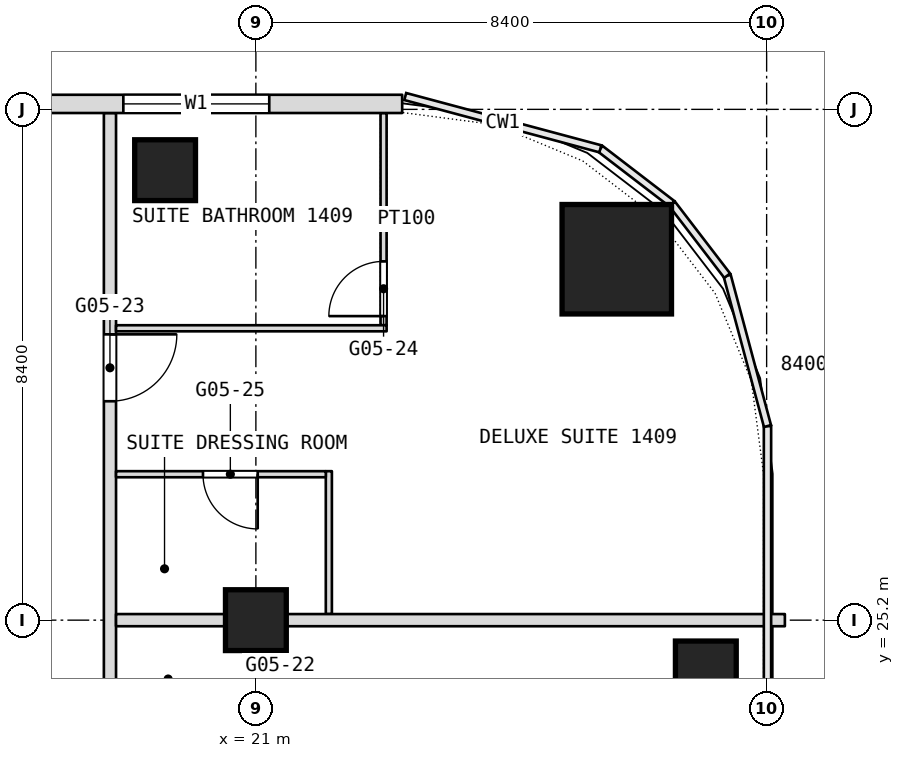
"""IFC4 building model, lengths in metres.
Left out: names, types, materials, properties, quantities, classifications, styles, units other than length and angle.
Written with IfcOpenShell. Run it as: python <this file> out.ifc"""

import sys

from ifc_helpers import new_model, si_unit, direction, frame, frame_2d, origin, origin_2d, place, context, subcontext, project, spatial, rectangle, extrude, element, fill, save


model = new_model("IFC4")
c1 = context("Model", 3, precision=1e-05, world=origin(), true_north=direction((0.0, 1.0)))
c2 = subcontext(c1, "Body", "Model", "MODEL_VIEW")
j1 = project(units=[si_unit("LENGTHUNIT", "METRE"), si_unit("PLANEANGLEUNIT", "RADIAN")], contexts=[c1])
p1 = place(None, origin())
s1 = spatial("IfcSite", under=j1, at=p1, CompositionType="ELEMENT")
p2 = place(p1, origin())
s2 = spatial("IfcBuilding", under=s1, at=p2, CompositionType="ELEMENT")
p3 = place(p2, frame((0.0, 0.0, 65.3)))
s3 = spatial("IfcBuildingStorey", under=s2, at=p3, CompositionType="ELEMENT", Elevation=65.3)
p4 = place(p3, frame((26.936, 31.135, 0.0), z_axis=(0.0, 0.0, 1.0), x_axis=(1.0, 0.0, 0.0)))
e1 = element("IfcColumn", 1, at=p4, inside=s3, PredefinedType="COLUMN", context=c2, shape_type="SweptSolid", body=[
    extrude(rectangle(XDim=1.8, YDim=1.8, at=origin_2d()), origin(), (0.0, 0.0, 1.0), 3.6),
])
for number, where, z_axis, x_axis in (
    (2, (21.0, 25.2, 0.0), (0.0, 0.0, 1.0), (1.0, 0.0, 0.0)),
    (3, (19.507, 32.6, 0.0), (0.0, 0.0, 1.0), (1.0, 0.0, 0.0)),
    (4, (28.4, 24.356, 0.0), (0.0, 0.0, 1.0), (1.0, 0.0, 0.0)),
):
    element("IfcColumn", number, at=place(p3, frame(where, z_axis=z_axis, x_axis=x_axis)), inside=s3, PredefinedType="COLUMN", context=c2, shape_type="SweptSolid", body=[
        extrude(rectangle(XDim=1.0, YDim=1.0, at=origin_2d()), origin(), (0.0, 0.0, 1.0), 3.6),
    ])
p5 = place(p3, frame((23.1, 30.05, 0.0), z_axis=(0.0, 0.0, 1.0), x_axis=(0.0, 1.0, 0.0)))
e5 = element("IfcWall", 5, at=p5, inside=s3, PredefinedType="PARTITIONING", context=c2, shape_type="SweptSolid", body=[
    extrude(rectangle(XDim=3.49, YDim=0.1, at=frame_2d((1.745, 0.0))), origin(), (0.0, 0.0, 1.0), 3.34),
])
p6 = place(p5, frame((0.15, 0.0, 0.0)))
e6 = element("IfcOpeningElement", 6, at=p6, cuts=e5, PredefinedType="OPENING", context=c2, shape_type="SweptSolid", body=[
    extrude(rectangle(XDim=0.9, YDim=2.1, at=frame_2d((0.45, 1.05))), frame((0.0, 0.05, 0.0), z_axis=(0.0, -1.0, 0.0), x_axis=(1.0, 0.0, 0.0)), (0.0, 0.0, 1.0), 0.1),
])
p7 = place(p3, frame((22.2, 25.3, 0.0), z_axis=(0.0, 0.0, 1.0), x_axis=(0.0, 1.0, 0.0)))
e7 = element("IfcWall", 7, at=p7, inside=s3, PredefinedType="PARTITIONING", context=c2, shape_type="SweptSolid", body=[
    extrude(rectangle(XDim=2.35, YDim=0.1, at=frame_2d((1.175, 0.0))), origin(), (0.0, 0.0, 1.0), 3.34),
])
p8 = place(p3, frame((21.4, 22.85, 0.0), z_axis=(0.0, 0.0, 1.0), x_axis=(0.0, 1.0, 0.0)))
e8 = element("IfcWall", 8, at=p8, inside=s3, PredefinedType="PARTITIONING", context=c2, shape_type="SweptSolid", body=[
    extrude(rectangle(XDim=2.45, YDim=0.1, at=frame_2d((1.225, 0.0))), origin(), (0.0, 0.0, 1.0), 3.34),
])
p9 = place(p8, frame((0.15, 0.0, 0.0)))
e9 = element("IfcOpeningElement", 9, at=p9, cuts=e8, PredefinedType="OPENING", context=c2, shape_type="SweptSolid", body=[
    extrude(rectangle(XDim=0.9, YDim=2.1, at=frame_2d((0.45, 1.05))), frame((0.0, 0.05, 0.0), z_axis=(0.0, -1.0, 0.0), x_axis=(1.0, 0.0, 0.0)), (0.0, 0.0, 1.0), 0.1),
])
p10 = place(p3, frame((18.6, -16.665, 0.0), z_axis=(0.0, 0.0, 1.0), x_axis=(0.0, 1.0, 0.0)))
e10 = element("IfcWall", 10, at=p10, inside=s3, PredefinedType="PARTITIONING", context=c2, shape_type="SweptSolid", body=[
    extrude(rectangle(XDim=50.205, YDim=0.2, at=frame_2d((25.103, 0.0))), origin(), (0.0, 0.0, 1.0), 3.34),
])
p11 = place(p10, frame((2.991, 0.0, 0.0)))
e11 = element("IfcOpeningElement", 11, at=p11, cuts=e10, PredefinedType="OPENING", context=c2, shape_type="SweptSolid", body=[
    extrude(rectangle(XDim=1.0, YDim=2.1, at=frame_2d((0.5, 1.05))), frame((0.0, 0.1, 0.0), z_axis=(0.0, -1.0, 0.0), x_axis=(1.0, 0.0, 0.0)), (0.0, 0.0, 1.0), 0.2),
])
p12 = place(p10, frame((4.574, 0.0, 0.0)))
e12 = element("IfcOpeningElement", 12, at=p12, cuts=e10, PredefinedType="OPENING", context=c2, shape_type="SweptSolid", body=[
    extrude(rectangle(XDim=1.0, YDim=2.1, at=frame_2d((0.5, 1.05))), frame((0.0, 0.1, 0.0), z_axis=(0.0, -1.0, 0.0), x_axis=(1.0, 0.0, 0.0)), (0.0, 0.0, 1.0), 0.2),
])
p13 = place(p10, frame((11.865, 0.0, 0.0)))
e13 = element("IfcOpeningElement", 13, at=p13, cuts=e10, PredefinedType="OPENING", context=c2, shape_type="SweptSolid", body=[
    extrude(rectangle(XDim=1.1, YDim=2.1, at=frame_2d((0.55, 1.05))), frame((0.0, 0.1, 0.0), z_axis=(0.0, -1.0, 0.0), x_axis=(1.0, 0.0, 0.0)), (0.0, 0.0, 1.0), 0.2),
])
p14 = place(p10, frame((20.365, 0.0, 0.0)))
e14 = element("IfcOpeningElement", 14, at=p14, cuts=e10, PredefinedType="OPENING", context=c2, shape_type="SweptSolid", body=[
    extrude(rectangle(XDim=1.1, YDim=2.1, at=frame_2d((0.55, 1.05))), frame((0.0, 0.1, 0.0), z_axis=(0.0, -1.0, 0.0), x_axis=(1.0, 0.0, 0.0)), (0.0, 0.0, 1.0), 0.2),
])
p15 = place(p10, frame((25.465, 0.0, 0.0)))
e15 = element("IfcOpeningElement", 15, at=p15, cuts=e10, PredefinedType="OPENING", context=c2, shape_type="SweptSolid", body=[
    extrude(rectangle(XDim=1.0, YDim=2.1, at=frame_2d((0.5, 1.05))), frame((0.0, 0.1, 0.0), z_axis=(0.0, -1.0, 0.0), x_axis=(1.0, 0.0, 0.0)), (0.0, 0.0, 1.0), 0.2),
])
p16 = place(p10, frame((32.065, 0.0, 0.0)))
e16 = element("IfcOpeningElement", 16, at=p16, cuts=e10, PredefinedType="OPENING", context=c2, shape_type="SweptSolid", body=[
    extrude(rectangle(XDim=1.0, YDim=2.1, at=frame_2d((0.5, 1.05))), frame((0.0, 0.1, 0.0), z_axis=(0.0, -1.0, 0.0), x_axis=(1.0, 0.0, 0.0)), (0.0, 0.0, 1.0), 0.2),
])
p17 = place(p10, frame((36.265, 0.0, 0.0)))
e17 = element("IfcOpeningElement", 17, at=p17, cuts=e10, PredefinedType="OPENING", context=c2, shape_type="SweptSolid", body=[
    extrude(rectangle(XDim=1.0, YDim=2.1, at=frame_2d((0.5, 1.05))), frame((0.0, 0.1, 0.0), z_axis=(0.0, -1.0, 0.0), x_axis=(1.0, 0.0, 0.0)), (0.0, 0.0, 1.0), 0.2),
])
p18 = place(p10, frame((38.065, 0.0, 0.0)))
e18 = element("IfcOpeningElement", 18, at=p18, cuts=e10, PredefinedType="OPENING", context=c2, shape_type="SweptSolid", body=[
    extrude(rectangle(XDim=1.0, YDim=2.1, at=frame_2d((0.5, 1.05))), frame((0.0, 0.1, 0.0), z_axis=(0.0, -1.0, 0.0), x_axis=(1.0, 0.0, 0.0)), (0.0, 0.0, 1.0), 0.2),
])
p19 = place(p10, frame((45.465, 0.0, 0.0)))
e19 = element("IfcOpeningElement", 19, at=p19, cuts=e10, PredefinedType="OPENING", context=c2, shape_type="SweptSolid", body=[
    extrude(rectangle(XDim=1.1, YDim=2.1, at=frame_2d((0.55, 1.05))), frame((0.0, 0.1, 0.0), z_axis=(0.0, -1.0, 0.0), x_axis=(1.0, 0.0, 0.0)), (0.0, 0.0, 1.0), 0.2),
])
p20 = place(p3, frame((18.7, 25.2, 0.0), z_axis=(0.0, 0.0, 1.0), x_axis=(1.0, 0.0, 0.0)))
e20 = element("IfcWall", 20, at=p20, inside=s3, PredefinedType="PARTITIONING", context=c2, shape_type="SweptSolid", body=[
    extrude(rectangle(XDim=11.0, YDim=0.2, at=frame_2d((5.5, 0.0))), origin(), (0.0, 0.0, 1.0), 2.84),
])
p21 = place(p3, frame((18.7, 27.6, 0.0), z_axis=(0.0, 0.0, 1.0), x_axis=(1.0, 0.0, 0.0)))
e21 = element("IfcWall", 21, at=p21, inside=s3, PredefinedType="PARTITIONING", context=c2, shape_type="SweptSolid", body=[
    extrude(rectangle(XDim=3.45, YDim=0.1, at=frame_2d((1.725, 0.0))), origin(), (0.0, 0.0, 1.0), 3.34),
])
p22 = place(p21, frame((1.43, 0.0, 0.0)))
e22 = element("IfcOpeningElement", 22, at=p22, cuts=e21, PredefinedType="OPENING", context=c2, shape_type="SweptSolid", body=[
    extrude(rectangle(XDim=0.9, YDim=2.1, at=frame_2d((0.45, 1.05))), frame((0.0, 0.05, 0.0), z_axis=(0.0, -1.0, 0.0), x_axis=(1.0, 0.0, 0.0)), (0.0, 0.0, 1.0), 0.1),
])
p23 = place(p3, frame((18.7, 30.0, 0.0), z_axis=(0.0, 0.0, 1.0), x_axis=(1.0, 0.0, 0.0)))
e23 = element("IfcWall", 23, at=p23, inside=s3, PredefinedType="PARTITIONING", context=c2, shape_type="SweptSolid", body=[
    extrude(rectangle(XDim=4.45, YDim=0.1, at=frame_2d((2.225, 0.0))), origin(), (0.0, 0.0, 1.0), 3.34),
])
p24 = place(p3, frame((23.406, 33.69, 0.0), z_axis=(0.0, 0.0, 1.0), x_axis=(-1.0, 0.0, 0.0)))
e24 = element("IfcWall", 24, at=p24, inside=s3, PredefinedType="NOTDEFINED", context=c2, shape_type="SweptSolid", body=[
    extrude(rectangle(XDim=46.812, YDim=0.3, at=frame_2d((23.406, 0.0))), origin(), (0.0, 0.0, 1.0), 3.6),
])
p25 = place(p24, frame((2.186, 0.0, 0.9)))
e25 = element("IfcOpeningElement", 25, at=p25, cuts=e24, PredefinedType="OPENING", context=c2, shape_type="SweptSolid", body=[
    extrude(rectangle(XDim=2.4, YDim=2.1, at=frame_2d((1.2, 1.05))), frame((0.0, 0.15, 0.0), z_axis=(0.0, -1.0, 0.0), x_axis=(1.0, 0.0, 0.0)), (0.0, 0.0, 1.0), 0.3),
])
p26 = place(p24, frame((7.506, 0.0, 0.9)))
e26 = element("IfcOpeningElement", 26, at=p26, cuts=e24, PredefinedType="OPENING", context=c2, shape_type="SweptSolid", body=[
    extrude(rectangle(XDim=2.4, YDim=2.1, at=frame_2d((1.2, 1.05))), frame((0.0, 0.15, 0.0), z_axis=(0.0, -1.0, 0.0), x_axis=(1.0, 0.0, 0.0)), (0.0, 0.0, 1.0), 0.3),
])
p27 = place(p24, frame((11.706, 0.0, 0.9)))
e27 = element("IfcOpeningElement", 27, at=p27, cuts=e24, PredefinedType="OPENING", context=c2, shape_type="SweptSolid", body=[
    extrude(rectangle(XDim=2.4, YDim=2.1, at=frame_2d((1.2, 1.05))), frame((0.0, 0.15, 0.0), z_axis=(0.0, -1.0, 0.0), x_axis=(1.0, 0.0, 0.0)), (0.0, 0.0, 1.0), 0.3),
])
p28 = place(p24, frame((15.906, 0.0, 0.9)))
e28 = element("IfcOpeningElement", 28, at=p28, cuts=e24, PredefinedType="OPENING", context=c2, shape_type="SweptSolid", body=[
    extrude(rectangle(XDim=2.4, YDim=2.1, at=frame_2d((1.2, 1.05))), frame((0.0, 0.15, 0.0), z_axis=(0.0, -1.0, 0.0), x_axis=(1.0, 0.0, 0.0)), (0.0, 0.0, 1.0), 0.3),
])
p29 = place(p24, frame((20.106, 0.0, 0.9)))
e29 = element("IfcOpeningElement", 29, at=p29, cuts=e24, PredefinedType="OPENING", context=c2, shape_type="SweptSolid", body=[
    extrude(rectangle(XDim=2.4, YDim=2.1, at=frame_2d((1.2, 1.05))), frame((0.0, 0.15, 0.0), z_axis=(0.0, -1.0, 0.0), x_axis=(1.0, 0.0, 0.0)), (0.0, 0.0, 1.0), 0.3),
])
p30 = place(p24, frame((24.306, 0.0, 0.9)))
e30 = element("IfcOpeningElement", 30, at=p30, cuts=e24, PredefinedType="OPENING", context=c2, shape_type="SweptSolid", body=[
    extrude(rectangle(XDim=2.4, YDim=2.1, at=frame_2d((1.2, 1.05))), frame((0.0, 0.15, 0.0), z_axis=(0.0, -1.0, 0.0), x_axis=(1.0, 0.0, 0.0)), (0.0, 0.0, 1.0), 0.3),
])
p31 = place(p24, frame((28.506, 0.0, 0.9)))
e31 = element("IfcOpeningElement", 31, at=p31, cuts=e24, PredefinedType="OPENING", context=c2, shape_type="SweptSolid", body=[
    extrude(rectangle(XDim=2.4, YDim=2.1, at=frame_2d((1.2, 1.05))), frame((0.0, 0.15, 0.0), z_axis=(0.0, -1.0, 0.0), x_axis=(1.0, 0.0, 0.0)), (0.0, 0.0, 1.0), 0.3),
])
p32 = place(p24, frame((32.706, 0.0, 0.9)))
e32 = element("IfcOpeningElement", 32, at=p32, cuts=e24, PredefinedType="OPENING", context=c2, shape_type="SweptSolid", body=[
    extrude(rectangle(XDim=2.4, YDim=2.1, at=frame_2d((1.2, 1.05))), frame((0.0, 0.15, 0.0), z_axis=(0.0, -1.0, 0.0), x_axis=(1.0, 0.0, 0.0)), (0.0, 0.0, 1.0), 0.3),
])
p33 = place(p24, frame((36.906, 0.0, 0.9)))
e33 = element("IfcOpeningElement", 33, at=p33, cuts=e24, PredefinedType="OPENING", context=c2, shape_type="SweptSolid", body=[
    extrude(rectangle(XDim=2.4, YDim=2.1, at=frame_2d((1.2, 1.05))), frame((0.0, 0.15, 0.0), z_axis=(0.0, -1.0, 0.0), x_axis=(1.0, 0.0, 0.0)), (0.0, 0.0, 1.0), 0.3),
])
p34 = place(p24, frame((42.226, 0.0, 0.9)))
e34 = element("IfcOpeningElement", 34, at=p34, cuts=e24, PredefinedType="OPENING", context=c2, shape_type="SweptSolid", body=[
    extrude(rectangle(XDim=2.4, YDim=2.1, at=frame_2d((1.2, 1.05))), frame((0.0, 0.15, 0.0), z_axis=(0.0, -1.0, 0.0), x_axis=(1.0, 0.0, 0.0)), (0.0, 0.0, 1.0), 0.3),
])
p35 = place(p6, origin())
e35 = element("IfcDoor", 35, at=p35, inside=s3, OperationType="SINGLE_SWING_LEFT", PredefinedType="DOOR", context=c2, shape_type="SweptSolid", body=[
    extrude(rectangle(XDim=0.9, YDim=2.1, at=frame_2d((0.45, 1.05))), frame((0.0, 0.025, 0.0), z_axis=(0.0, -1.0, 0.0), x_axis=(1.0, 0.0, 0.0)), (0.0, 0.0, 1.0), 0.05),
])
fill(e6, e35)
p36 = place(p19, origin())
e36 = element("IfcDoor", 36, at=p36, inside=s3, OperationType="SINGLE_SWING_LEFT", PredefinedType="DOOR", context=c2, shape_type="SweptSolid", body=[
    extrude(rectangle(XDim=1.1, YDim=2.1, at=frame_2d((0.55, 1.05))), frame((0.0, 0.025, 0.0), z_axis=(0.0, -1.0, 0.0), x_axis=(1.0, 0.0, 0.0)), (0.0, 0.0, 1.0), 0.05),
])
fill(e19, e36)
p37 = place(p22, origin())
e37 = element("IfcDoor", 37, at=p37, inside=s3, OperationType="SINGLE_SWING_LEFT", PredefinedType="DOOR", context=c2, shape_type="SweptSolid", body=[
    extrude(rectangle(XDim=0.9, YDim=2.1, at=frame_2d((0.45, 1.05))), frame((0.0, 0.025, 0.0), z_axis=(0.0, -1.0, 0.0), x_axis=(1.0, 0.0, 0.0)), (0.0, 0.0, 1.0), 0.05),
])
fill(e22, e37)
p38 = place(p25, origin())
e38 = element("IfcWindow", 38, at=p38, inside=s3, PartitioningType="SINGLE_PANEL", PredefinedType="WINDOW", context=c2, shape_type="SweptSolid", body=[
    extrude(rectangle(XDim=2.4, YDim=2.1, at=frame_2d((1.2, 1.05))), frame((0.0, 0.03, 0.0), z_axis=(0.0, -1.0, 0.0), x_axis=(1.0, 0.0, 0.0)), (0.0, 0.0, 1.0), 0.06),
])
fill(e25, e38)
save(model, sys.argv[1])
